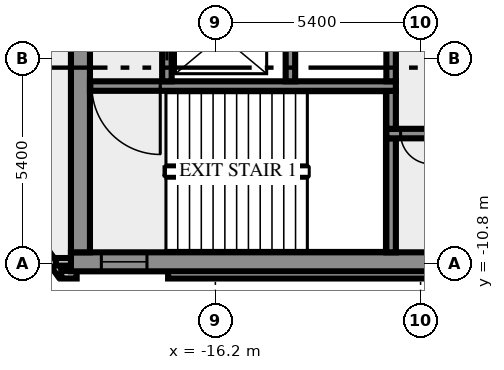
"""IFC4 building model, lengths in metres.
Left out: names, types, materials, properties, quantities, classifications, styles, units other than length and angle.
Written with IfcOpenShell. Run it as: python <this file> out.ifc"""

import sys

from ifc_helpers import new_model, si_unit, direction, frame, frame_2d, origin, place, context, subcontext, project, spatial, rectangle, extrude, element, fill, save


model = new_model("IFC4")
c1 = context("Model", 3, precision=1e-05, world=origin(), true_north=direction((0.0, 1.0)))
c2 = subcontext(c1, "Body", "Model", "MODEL_VIEW")
j1 = project(units=[si_unit("LENGTHUNIT", "METRE"), si_unit("PLANEANGLEUNIT", "RADIAN")], contexts=[c1])
p1 = place(None, origin())
s1 = spatial("IfcSite", under=j1, at=p1, CompositionType="ELEMENT")
p2 = place(p1, origin())
s2 = spatial("IfcBuilding", under=s1, at=p2, CompositionType="ELEMENT")
p3 = place(p2, frame((0.0, 0.0, 253.0)))
s3 = spatial("IfcBuildingStorey", under=s2, at=p3, CompositionType="ELEMENT", Elevation=253.0)
p4 = place(p3, frame((-21.833, -8.909, 0.0), z_axis=(0.0, 0.0, 1.0), x_axis=(0.587766567315, -0.809030569476, 0.0)))
e1 = element("IfcWall", 1, at=p4, inside=s3, PredefinedType="SOLIDWALL", context=c2, shape_type="SweptSolid", body=[
    extrude(rectangle(XDim=2.688, YDim=0.2, at=frame_2d((1.344, 0.0))), origin(), (0.0, 0.0, 1.0), 3.65),
])
p5 = place(p3, frame((-20.256, -11.088, 0.0), z_axis=(0.0, 0.0, 1.0), x_axis=(1.0, 0.0, 0.0)))
e2 = element("IfcWall", 2, at=p5, inside=s3, PredefinedType="SOLIDWALL", context=c2, shape_type="SweptSolid", body=[
    extrude(rectangle(XDim=0.406, YDim=0.2, at=frame_2d((0.203, 0.0))), origin(), (0.0, 0.0, 1.0), 3.65),
])
p6 = place(p3, frame((-17.444, -11.088, 0.0), z_axis=(0.0, 0.0, 1.0), x_axis=(1.0, 0.0, 0.0)))
e3 = element("IfcWall", 3, at=p6, inside=s3, PredefinedType="SOLIDWALL", context=c2, shape_type="SweptSolid", body=[
    extrude(rectangle(XDim=34.888, YDim=0.2, at=frame_2d((17.444, 0.0))), origin(), (0.0, 0.0, 1.0), 3.65),
])
p7 = place(p3, frame((-19.98, -10.75, 0.0), z_axis=(0.0, 0.0, 1.0), x_axis=(-1.0, 0.0, 0.0)))
e4 = element("IfcWall", 4, at=p7, inside=s3, PredefinedType="SOLIDWALL", context=c2, shape_type="SweptSolid", body=[
    extrude(rectangle(XDim=0.417, YDim=0.2, at=frame_2d((0.208, 0.0))), origin(), (0.0, 0.0, 1.0), 3.65),
])
p8 = place(p3, frame((-20.0, -10.75, 0.0), z_axis=(0.0, 0.0, 1.0), x_axis=(1.0, 0.0, 0.0)))
e5 = element("IfcWall", 5, at=p8, inside=s3, PredefinedType="SHEAR", context=c2, shape_type="SweptSolid", body=[
    extrude(rectangle(XDim=40.0, YDim=0.5, at=frame_2d((20.0, 0.0))), origin(), (0.0, 0.0, 1.0), 3.65),
])
p9 = place(p8, frame((0.8, 0.0, 1.0)))
e6 = element("IfcOpeningElement", 6, at=p9, cuts=e5, PredefinedType="OPENING", context=c2, shape_type="SweptSolid", body=[
    extrude(rectangle(XDim=1.2, YDim=1.2, at=frame_2d((0.6, 0.6))), frame((0.0, 0.26, 0.0), z_axis=(0.0, -1.0, 0.0), x_axis=(1.0, 0.0, 0.0)), (0.0, 0.0, 1.0), 0.52),
])
p10 = place(p8, frame((38.0, 0.0, 1.0)))
e7 = element("IfcOpeningElement", 7, at=p10, cuts=e5, PredefinedType="OPENING", context=c2, shape_type="SweptSolid", body=[
    extrude(rectangle(XDim=1.2, YDim=1.2, at=frame_2d((0.6, 0.6))), frame((0.0, 0.26, 0.0), z_axis=(0.0, -1.0, 0.0), x_axis=(1.0, 0.0, 0.0)), (0.0, 0.0, 1.0), 0.52),
])
p11 = place(p3, frame((-19.75, -10.5, 0.0), z_axis=(0.0, 0.0, 1.0), x_axis=(0.0, 1.0, 0.0)))
e8 = element("IfcWall", 8, at=p11, inside=s3, PredefinedType="SHEAR", context=c2, shape_type="SweptSolid", body=[
    extrude(rectangle(XDim=8.8, YDim=0.5, at=frame_2d((4.4, 0.0))), origin(), (0.0, 0.0, 1.0), 3.65),
])
p12 = place(p3, frame((-11.575, -10.5, 0.0), z_axis=(0.0, 0.0, 1.0), x_axis=(0.0, 1.0, 0.0)))
e9 = element("IfcWall", 9, at=p12, inside=s3, PredefinedType="SHEAR", context=c2, shape_type="SweptSolid", body=[
    extrude(rectangle(XDim=3.0, YDim=0.25, at=frame_2d((1.5, 0.0))), origin(), (0.0, 0.0, 1.0), 3.65),
])
p13 = place(p3, frame((11.7, -7.375, 0.0), z_axis=(0.0, 0.0, 1.0), x_axis=(-1.0, 0.0, 0.0)))
e10 = element("IfcWall", 10, at=p13, inside=s3, PredefinedType="SHEAR", context=c2, shape_type="SweptSolid", body=[
    extrude(rectangle(XDim=23.4, YDim=0.25, at=frame_2d((11.7, 0.0))), origin(), (0.0, 0.0, 1.0), 3.65),
])
p14 = place(p13, frame((22.225, 0.0, 0.0)))
e11 = element("IfcOpeningElement", 11, at=p14, cuts=e10, PredefinedType="OPENING", context=c2, shape_type="SweptSolid", body=[
    extrude(rectangle(XDim=0.8, YDim=2.1, at=frame_2d((0.4, 1.05))), frame((0.0, 0.135, 0.0), z_axis=(0.0, -1.0, 0.0), x_axis=(1.0, 0.0, 0.0)), (0.0, 0.0, 1.0), 0.27),
])
p15 = place(p13, frame((20.2, 0.0, 0.0)))
e12 = element("IfcOpeningElement", 12, at=p15, cuts=e10, PredefinedType="OPENING", context=c2, shape_type="SweptSolid", body=[
    extrude(rectangle(XDim=1.1, YDim=2.1, at=frame_2d((0.55, 1.05))), frame((0.0, 0.135, 0.0), z_axis=(0.0, -1.0, 0.0), x_axis=(1.0, 0.0, 0.0)), (0.0, 0.0, 1.0), 0.27),
])
p16 = place(p13, frame((17.7, 0.0, 0.0)))
e13 = element("IfcOpeningElement", 13, at=p16, cuts=e10, PredefinedType="OPENING", context=c2, shape_type="SweptSolid", body=[
    extrude(rectangle(XDim=1.1, YDim=2.1, at=frame_2d((0.55, 1.05))), frame((0.0, 0.135, 0.0), z_axis=(0.0, -1.0, 0.0), x_axis=(1.0, 0.0, 0.0)), (0.0, 0.0, 1.0), 0.27),
])
p17 = place(p13, frame((15.975, 0.0, 0.0)))
e14 = element("IfcOpeningElement", 14, at=p17, cuts=e10, PredefinedType="OPENING", context=c2, shape_type="SweptSolid", body=[
    extrude(rectangle(XDim=0.8, YDim=2.1, at=frame_2d((0.4, 1.05))), frame((0.0, 0.135, 0.0), z_axis=(0.0, -1.0, 0.0), x_axis=(1.0, 0.0, 0.0)), (0.0, 0.0, 1.0), 0.27),
])
p18 = place(p13, frame((14.75, 0.0, 0.0)))
e15 = element("IfcOpeningElement", 15, at=p18, cuts=e10, PredefinedType="OPENING", context=c2, shape_type="SweptSolid", body=[
    extrude(rectangle(XDim=0.7, YDim=2.1, at=frame_2d((0.35, 1.05))), frame((0.0, 0.135, 0.0), z_axis=(0.0, -1.0, 0.0), x_axis=(1.0, 0.0, 0.0)), (0.0, 0.0, 1.0), 0.27),
])
p19 = place(p13, frame((13.35, 0.0, 0.0)))
e16 = element("IfcOpeningElement", 16, at=p19, cuts=e10, PredefinedType="OPENING", context=c2, shape_type="SweptSolid", body=[
    extrude(rectangle(XDim=0.9, YDim=2.1, at=frame_2d((0.45, 1.05))), frame((0.0, 0.135, 0.0), z_axis=(0.0, -1.0, 0.0), x_axis=(1.0, 0.0, 0.0)), (0.0, 0.0, 1.0), 0.27),
])
p20 = place(p13, frame((11.975, 0.0, 0.0)))
e17 = element("IfcOpeningElement", 17, at=p20, cuts=e10, PredefinedType="OPENING", context=c2, shape_type="SweptSolid", body=[
    extrude(rectangle(XDim=0.9, YDim=2.1, at=frame_2d((0.45, 1.05))), frame((0.0, 0.135, 0.0), z_axis=(0.0, -1.0, 0.0), x_axis=(1.0, 0.0, 0.0)), (0.0, 0.0, 1.0), 0.27),
])
p21 = place(p13, frame((10.5, 0.0, 0.0)))
e18 = element("IfcOpeningElement", 18, at=p21, cuts=e10, PredefinedType="OPENING", context=c2, shape_type="SweptSolid", body=[
    extrude(rectangle(XDim=0.9, YDim=2.1, at=frame_2d((0.45, 1.05))), frame((0.0, 0.135, 0.0), z_axis=(0.0, -1.0, 0.0), x_axis=(1.0, 0.0, 0.0)), (0.0, 0.0, 1.0), 0.27),
])
p22 = place(p13, frame((8.388, 0.0, 0.0)))
e19 = element("IfcOpeningElement", 19, at=p22, cuts=e10, PredefinedType="OPENING", context=c2, shape_type="SweptSolid", body=[
    extrude(rectangle(XDim=0.9, YDim=2.1, at=frame_2d((0.45, 1.05))), frame((0.0, 0.135, 0.0), z_axis=(0.0, -1.0, 0.0), x_axis=(1.0, 0.0, 0.0)), (0.0, 0.0, 1.0), 0.27),
])
p23 = place(p13, frame((5.375, 0.0, 0.0)))
e20 = element("IfcOpeningElement", 20, at=p23, cuts=e10, PredefinedType="OPENING", context=c2, shape_type="SweptSolid", body=[
    extrude(rectangle(XDim=0.9, YDim=2.1, at=frame_2d((0.45, 1.05))), frame((0.0, 0.135, 0.0), z_axis=(0.0, -1.0, 0.0), x_axis=(1.0, 0.0, 0.0)), (0.0, 0.0, 1.0), 0.27),
])
p24 = place(p13, frame((1.688, 0.0, 0.0)))
e21 = element("IfcOpeningElement", 21, at=p24, cuts=e10, PredefinedType="OPENING", context=c2, shape_type="SweptSolid", body=[
    extrude(rectangle(XDim=0.9, YDim=2.1, at=frame_2d((0.45, 1.05))), frame((0.0, 0.135, 0.0), z_axis=(0.0, -1.0, 0.0), x_axis=(1.0, 0.0, 0.0)), (0.0, 0.0, 1.0), 0.27),
])
p25 = place(p3, frame((-11.575, -7.25, 0.0), z_axis=(0.0, 0.0, 1.0), x_axis=(0.0, 1.0, 0.0)))
e22 = element("IfcWall", 22, at=p25, inside=s3, PredefinedType="SHEAR", context=c2, shape_type="SweptSolid", body=[
    extrude(rectangle(XDim=1.0, YDim=0.25, at=frame_2d((0.5, 0.0))), origin(), (0.0, 0.0, 1.0), 3.65),
])
p26 = place(p3, frame((-11.45, -6.125, 0.0), z_axis=(0.0, 0.0, 1.0), x_axis=(-1.0, 0.0, 0.0)))
e23 = element("IfcWall", 23, at=p26, inside=s3, PredefinedType="SHEAR", context=c2, shape_type="SweptSolid", body=[
    extrude(rectangle(XDim=8.05, YDim=0.25, at=frame_2d((4.025, 0.0))), origin(), (0.0, 0.0, 1.0), 3.65),
])
p27 = place(p26, frame((6.2, 0.0, 0.0)))
e24 = element("IfcOpeningElement", 24, at=p27, cuts=e23, PredefinedType="OPENING", context=c2, shape_type="SweptSolid", body=[
    extrude(rectangle(XDim=1.8, YDim=2.1, at=frame_2d((0.9, 1.05))), frame((0.0, 0.135, 0.0), z_axis=(0.0, -1.0, 0.0), x_axis=(1.0, 0.0, 0.0)), (0.0, 0.0, 1.0), 0.27),
])
p28 = place(p3, frame((-17.475, -6.0, 0.0), z_axis=(0.0, 0.0, 1.0), x_axis=(0.0, 1.0, 0.0)))
e25 = element("IfcWall", 25, at=p28, inside=s3, PredefinedType="SHEAR", context=c2, shape_type="SweptSolid", body=[
    extrude(rectangle(XDim=4.3, YDim=0.25, at=frame_2d((2.15, 0.0))), origin(), (0.0, 0.0, 1.0), 3.65),
])
p29 = place(p28, frame((0.55, 0.0, 0.0)))
e26 = element("IfcOpeningElement", 26, at=p29, cuts=e25, PredefinedType="OPENING", context=c2, shape_type="SweptSolid", body=[
    extrude(rectangle(XDim=1.3, YDim=2.1, at=frame_2d((0.65, 1.05))), frame((0.0, 0.135, 0.0), z_axis=(0.0, -1.0, 0.0), x_axis=(1.0, 0.0, 0.0)), (0.0, 0.0, 1.0), 0.27),
])
for number, where, z_axis, x_axis in (
    (27, (-14.225, -6.0, 0.0), (0.0, 0.0, 1.0), (0.0, 1.0, 0.0)),
    (28, (-11.575, -6.0, 0.0), (0.0, 0.0, 1.0), (0.0, 1.0, 0.0)),
):
    element("IfcWall", number, at=place(p3, frame(where, z_axis=z_axis, x_axis=x_axis)), inside=s3, PredefinedType="SHEAR", context=c2, shape_type="SweptSolid", body=[
        extrude(rectangle(XDim=1.75, YDim=0.25, at=frame_2d((0.875, 0.0))), origin(), (0.0, 0.0, 1.0), 3.65),
    ])
p30 = place(p9, origin())
e29 = element("IfcWindow", 29, at=p30, inside=s3, PartitioningType="SINGLE_PANEL", PredefinedType="WINDOW", context=c2, shape_type="SweptSolid", body=[
    extrude(rectangle(XDim=1.2, YDim=1.2, at=frame_2d((0.6, 0.6))), frame((0.0, 0.03, 0.0), z_axis=(0.0, -1.0, 0.0), x_axis=(1.0, 0.0, 0.0)), (0.0, 0.0, 1.0), 0.06),
])
fill(e6, e29)
p31 = place(p14, origin())
e30 = element("IfcDoor", 30, at=p31, inside=s3, OperationType="SINGLE_SWING_RIGHT", PredefinedType="DOOR", context=c2, shape_type="SweptSolid", body=[
    extrude(rectangle(XDim=0.8, YDim=2.1, at=frame_2d((0.4, 1.05))), frame((0.0, 0.025, 0.0), z_axis=(0.0, -1.0, 0.0), x_axis=(1.0, 0.0, 0.0)), (0.0, 0.0, 1.0), 0.05),
])
fill(e11, e30)
p32 = place(p27, origin())
e31 = element("IfcDoor", 31, at=p32, inside=s3, OperationType="DOUBLE_DOOR_SINGLE_SWING", PredefinedType="DOOR", context=c2, shape_type="SweptSolid", body=[
    extrude(rectangle(XDim=1.8, YDim=2.1, at=frame_2d((0.9, 1.05))), frame((0.0, 0.025, 0.0), z_axis=(0.0, -1.0, 0.0), x_axis=(1.0, 0.0, 0.0)), (0.0, 0.0, 1.0), 0.05),
])
fill(e24, e31)
p33 = place(p29, origin())
e32 = element("IfcDoor", 32, at=p33, inside=s3, OperationType="DOUBLE_DOOR_SLIDING", PredefinedType="DOOR", context=c2, shape_type="SweptSolid", body=[
    extrude(rectangle(XDim=1.3, YDim=2.1, at=frame_2d((0.65, 1.05))), frame((0.0, 0.025, 0.0), z_axis=(0.0, -1.0, 0.0), x_axis=(1.0, 0.0, 0.0)), (0.0, 0.0, 1.0), 0.05),
])
fill(e26, e32)
save(model, sys.argv[1])
